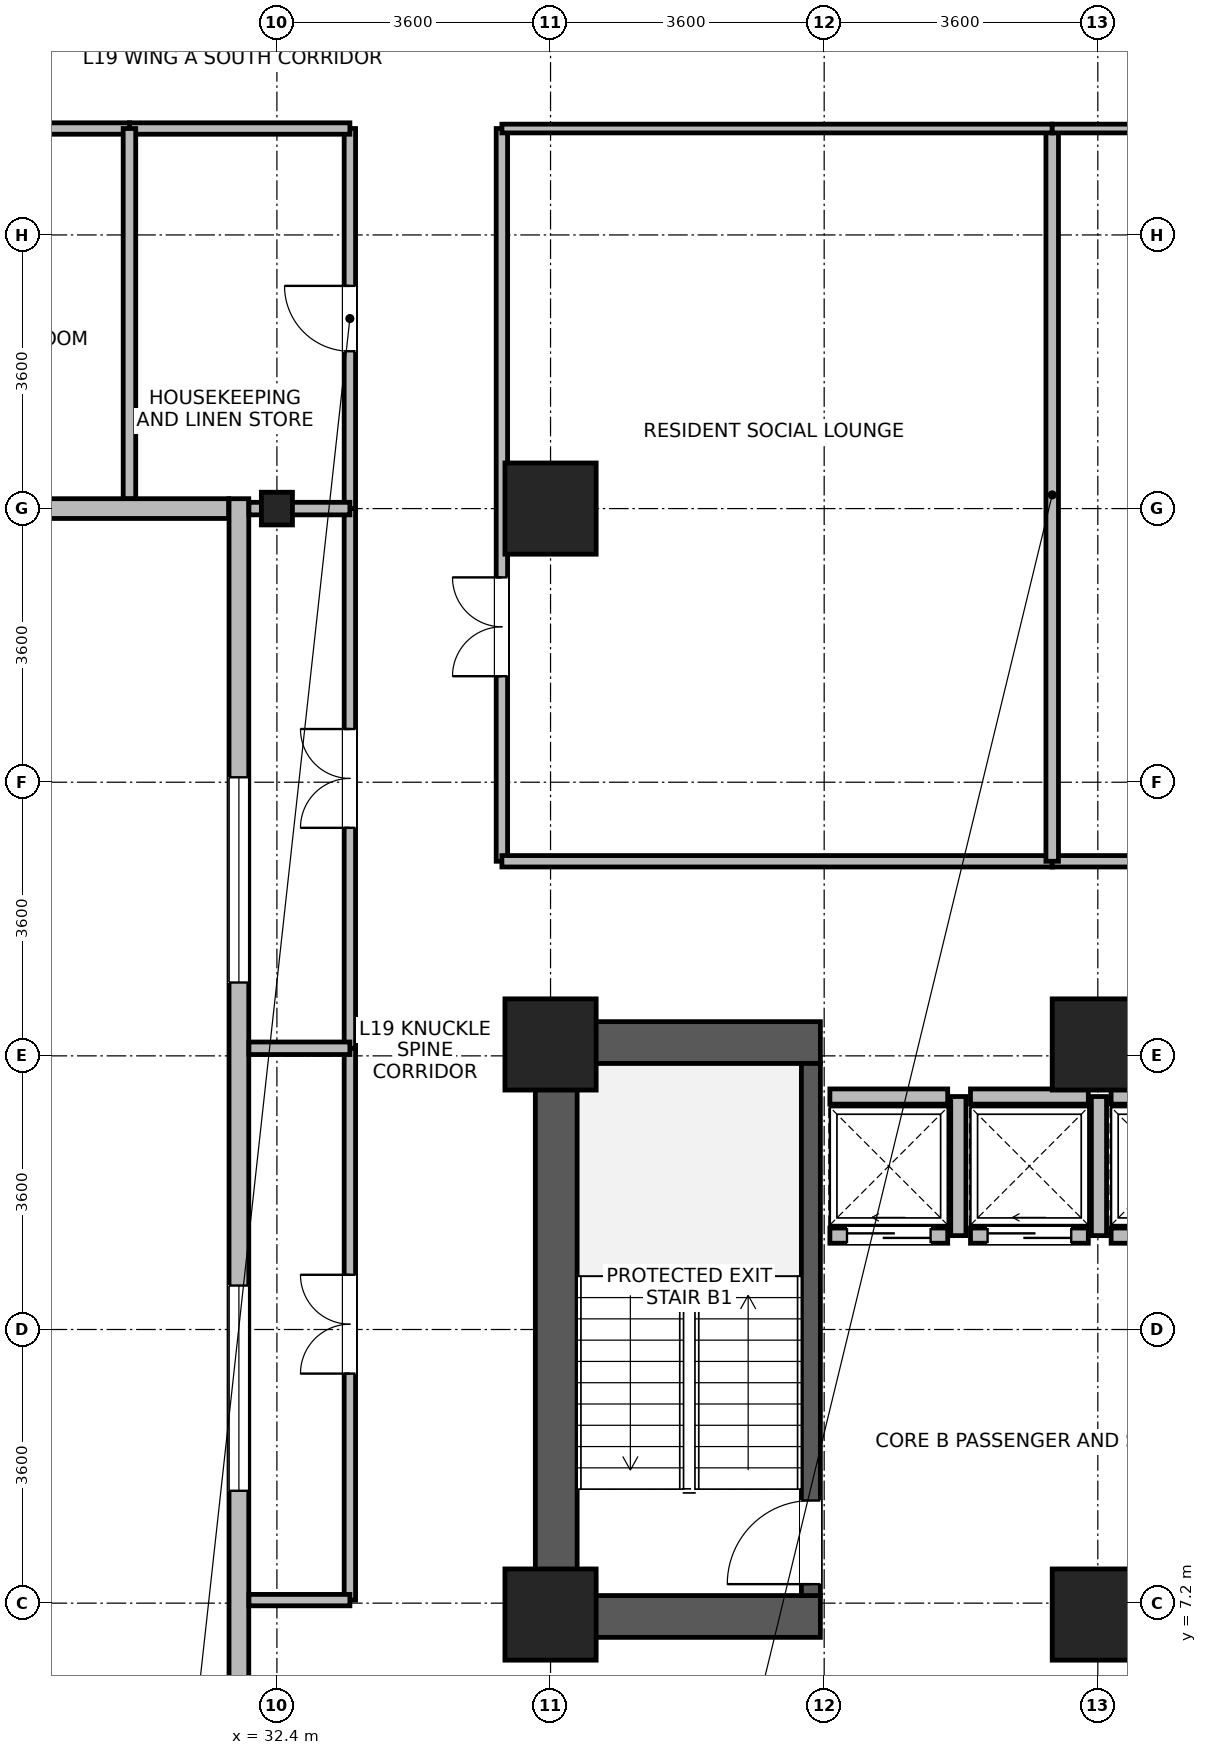
"""IFC4 building model, lengths in metres.
Left out: names, types, materials, properties, quantities, classifications, styles, units other than length and angle.
Written with IfcOpenShell. Run it as: python <this file> out.ifc"""

import sys

from ifc_helpers import new_model, si_unit, direction, frame, frame_2d, origin, origin_2d, place, context, subcontext, project, spatial, rectangle, i_section, extrude, source, transform, mapped, element, fill, save


model = new_model("IFC4")
c1 = context("Model", 3, precision=1e-05, world=origin(), true_north=direction((0.0, 1.0)))
c2 = subcontext(c1, "Body", "Model", "MODEL_VIEW")
j1 = project(units=[si_unit("LENGTHUNIT", "METRE"), si_unit("PLANEANGLEUNIT", "RADIAN")], contexts=[c1])
p1 = place(None, origin())
s1 = spatial("IfcSite", under=j1, at=p1, CompositionType="ELEMENT")
p2 = place(p1, origin())
s2 = spatial("IfcBuilding", under=s1, at=p2, CompositionType="ELEMENT")
p3 = place(p2, frame((0.0, 0.0, 78.6)))
s3 = spatial("IfcBuildingStorey", under=s2, at=p3, CompositionType="ELEMENT", Elevation=78.6)
p4 = place(p3, frame((36.075, 6.75, 0.0), z_axis=(0.0, 0.0, 1.0), x_axis=(0.0, 1.0, 0.0)))
e1 = element("IfcWall", 1, at=p4, inside=s3, PredefinedType="SHEAR", context=c2, shape_type="SweptSolid", body=[
    extrude(rectangle(XDim=8.1, YDim=0.55, at=frame_2d((4.05, 0.0))), origin(), (0.0, 0.0, 1.0), 3.45),
])
for number, where, z_axis, x_axis in (
    (2, (36.35, 7.025, 0.0), (0.0, 0.0, 1.0), (1.0, 0.0, 0.0)),
    (3, (36.35, 14.575, 0.0), (0.0, 0.0, 1.0), (1.0, 0.0, 0.0)),
):
    element("IfcWall", number, at=place(p3, frame(where, z_axis=z_axis, x_axis=x_axis)), inside=s3, PredefinedType="SHEAR", context=c2, shape_type="SweptSolid", body=[
        extrude(rectangle(XDim=3.2, YDim=0.55, at=frame_2d((1.6, 0.0))), origin(), (0.0, 0.0, 1.0), 3.45),
    ])
p5 = place(p3, frame((39.425, 7.3, 0.0), z_axis=(0.0, 0.0, 1.0), x_axis=(0.0, 1.0, 0.0)))
e4 = element("IfcWall", 4, at=p5, inside=s3, PredefinedType="SHEAR", context=c2, shape_type="SweptSolid", body=[
    extrude(rectangle(XDim=7.0, YDim=0.25, at=frame_2d((3.5, 0.0))), origin(), (0.0, 0.0, 1.0), 3.45),
])
p6 = place(p5, frame((0.15, 0.0, 0.0)))
e5 = element("IfcOpeningElement", 5, at=p6, cuts=e4, PredefinedType="OPENING", context=c2, shape_type="SweptSolid", body=[
    extrude(rectangle(XDim=1.1, YDim=2.08, at=frame_2d((0.55, 1.04))), frame((0.0, 0.135, 0.0), z_axis=(0.0, -1.0, 0.0), x_axis=(1.0, 0.0, 0.0)), (0.0, 0.0, 1.0), 0.27),
])
m1 = source(origin(), c2, "Body", "SweptSolid", [
    extrude(rectangle(XDim=1.2, YDim=1.2, at=origin_2d()), origin(), (0.0, 0.0, 1.0), 3.7),
])
for number, where, z_axis, x_axis in (
    (6, (36.0, 21.6, 0.0), (0.0, 0.0, 1.0), (1.0, 0.0, 0.0)),
    (7, (36.0, 7.05, 0.0), (0.0, 0.0, 1.0), (1.0, 0.0, 0.0)),
    (8, (36.0, 14.55, 0.0), (0.0, 0.0, 1.0), (1.0, 0.0, 0.0)),
    (9, (43.2, 7.05, 0.0), (0.0, 0.0, 1.0), (1.0, 0.0, 0.0)),
    (10, (43.2, 14.55, 0.0), (0.0, 0.0, 1.0), (1.0, 0.0, 0.0)),
):
    element("IfcColumn", number, at=place(p3, frame(where, z_axis=z_axis, x_axis=x_axis)), inside=s3, PredefinedType="COLUMN", context=c2, shape_type="MappedRepresentation", body=[
        mapped(m1, transform((0.0, 0.0, 0.0), x_axis=(1.0, 0.0, 0.0), y_axis=(0.0, 1.0, 0.0), z_axis=(0.0, 0.0, 1.0), scale=1.0)),
    ])
m2 = source(origin(), c2, "Body", "SweptSolid", [
    extrude(i_section(OverallWidth=0.409, OverallDepth=0.43, WebThickness=0.024, FlangeThickness=0.033, FilletRadius=0.015, at=origin_2d()), origin(), (0.0, 0.0, 1.0), 3.7),
])
p7 = place(p3, frame((32.4, 21.6, 0.0), z_axis=(0.0, 0.0, 1.0), x_axis=(1.0, 0.0, 0.0)))
e11 = element("IfcColumn", 11, at=p7, inside=s3, PredefinedType="COLUMN", context=c2, shape_type="MappedRepresentation", body=[
    mapped(m2, transform((0.0, 0.0, 0.0), x_axis=(1.0, 0.0, 0.0), y_axis=(0.0, 1.0, 0.0), z_axis=(0.0, 0.0, 1.0), scale=1.0)),
])
p8 = place(p3, frame((31.765, 21.6, 0.0), z_axis=(0.0, 0.0, 1.0), x_axis=(-1.0, 0.0, 0.0)))
e12 = element("IfcWall", 12, at=p8, inside=s3, PredefinedType="STANDARD", context=c2, shape_type="SweptSolid", body=[
    extrude(rectangle(XDim=2.364, YDim=0.26, at=frame_2d((1.182, 0.0))), origin(), (0.0, 0.0, 1.0), 2.93),
])
p9 = place(p3, frame((31.9, 1.67, 0.0), z_axis=(0.0, 0.0, 1.0), x_axis=(0.0, 1.0, 0.0)))
e13 = element("IfcWall", 13, at=p9, inside=s3, PredefinedType="STANDARD", context=c2, shape_type="SweptSolid", body=[
    extrude(rectangle(XDim=20.06, YDim=0.26, at=frame_2d((10.03, 0.0))), origin(), (0.0, 0.0, 1.0), 3.43),
])
p10 = place(p9, frame((7.008, 0.0, 0.85)))
e14 = element("IfcOpeningElement", 14, at=p10, cuts=e13, PredefinedType="OPENING", context=c2, shape_type="SweptSolid", body=[
    extrude(rectangle(XDim=2.7, YDim=2.05, at=frame_2d((1.35, 1.025))), frame((0.0, 0.14, 0.0), z_axis=(0.0, -1.0, 0.0), x_axis=(1.0, 0.0, 0.0)), (0.0, 0.0, 1.0), 0.28),
])
p11 = place(p9, frame((13.695, 0.0, 0.85)))
e15 = element("IfcOpeningElement", 15, at=p11, cuts=e13, PredefinedType="OPENING", context=c2, shape_type="SweptSolid", body=[
    extrude(rectangle(XDim=2.7, YDim=2.05, at=frame_2d((1.35, 1.025))), frame((0.0, 0.14, 0.0), z_axis=(0.0, -1.0, 0.0), x_axis=(1.0, 0.0, 0.0)), (0.0, 0.0, 1.0), 0.28),
])
p12 = place(p3, frame((39.675, 12.035, 0.0), z_axis=(0.0, 0.0, 1.0), x_axis=(1.0, 0.0, 0.0)))
e16 = element("IfcWall", 16, at=p12, inside=s3, PredefinedType="PARTITIONING", context=c2, shape_type="SweptSolid", body=[
    extrude(rectangle(XDim=1.55, YDim=0.2, at=frame_2d((0.775, 0.0))), origin(), (0.0, 0.0, 1.0), 3.43),
])
p13 = place(p12, frame((0.225, 0.0, 0.0)))
e17 = element("IfcOpeningElement", 17, at=p13, cuts=e16, PredefinedType="OPENING", context=c2, shape_type="SweptSolid", body=[
    extrude(rectangle(XDim=1.1, YDim=2.12, at=frame_2d((0.55, 1.06))), frame((0.0, 0.11, 0.0), z_axis=(0.0, -1.0, 0.0), x_axis=(1.0, 0.0, 0.0)), (0.0, 0.0, 1.0), 0.22),
])
p14 = place(p3, frame((39.675, 13.865, 0.0), z_axis=(0.0, 0.0, 1.0), x_axis=(1.0, 0.0, 0.0)))
e18 = element("IfcWall", 18, at=p14, inside=s3, PredefinedType="PARTITIONING", context=c2, shape_type="SweptSolid", body=[
    extrude(rectangle(XDim=1.55, YDim=0.2, at=frame_2d((0.775, 0.0))), origin(), (0.0, 0.0, 1.0), 3.43),
])
p15 = place(p3, frame((41.365, 12.035, 0.0), z_axis=(0.0, 0.0, 1.0), x_axis=(0.0, 1.0, 0.0)))
e19 = element("IfcWall", 19, at=p15, inside=s3, PredefinedType="PARTITIONING", context=c2, shape_type="SweptSolid", body=[
    extrude(rectangle(XDim=1.83, YDim=0.2, at=frame_2d((0.915, 0.0))), origin(), (0.0, 0.0, 1.0), 3.43),
])
p16 = place(p3, frame((41.525, 12.035, 0.0), z_axis=(0.0, 0.0, 1.0), x_axis=(1.0, 0.0, 0.0)))
e20 = element("IfcWall", 20, at=p16, inside=s3, PredefinedType="PARTITIONING", context=c2, shape_type="SweptSolid", body=[
    extrude(rectangle(XDim=1.55, YDim=0.2, at=frame_2d((0.775, 0.0))), origin(), (0.0, 0.0, 1.0), 3.43),
])
p17 = place(p16, frame((0.225, 0.0, 0.0)))
e21 = element("IfcOpeningElement", 21, at=p17, cuts=e20, PredefinedType="OPENING", context=c2, shape_type="SweptSolid", body=[
    extrude(rectangle(XDim=1.1, YDim=2.12, at=frame_2d((0.55, 1.06))), frame((0.0, 0.11, 0.0), z_axis=(0.0, -1.0, 0.0), x_axis=(1.0, 0.0, 0.0)), (0.0, 0.0, 1.0), 0.22),
])
p18 = place(p3, frame((41.525, 13.865, 0.0), z_axis=(0.0, 0.0, 1.0), x_axis=(1.0, 0.0, 0.0)))
e22 = element("IfcWall", 22, at=p18, inside=s3, PredefinedType="PARTITIONING", context=c2, shape_type="SweptSolid", body=[
    extrude(rectangle(XDim=1.55, YDim=0.2, at=frame_2d((0.775, 0.0))), origin(), (0.0, 0.0, 1.0), 3.43),
])
p19 = place(p3, frame((43.215, 12.035, 0.0), z_axis=(0.0, 0.0, 1.0), x_axis=(0.0, 1.0, 0.0)))
e23 = element("IfcWall", 23, at=p19, inside=s3, PredefinedType="PARTITIONING", context=c2, shape_type="SweptSolid", body=[
    extrude(rectangle(XDim=1.83, YDim=0.2, at=frame_2d((0.915, 0.0))), origin(), (0.0, 0.0, 1.0), 3.43),
])
p20 = place(p3, frame((43.375, 12.035, 0.0), z_axis=(0.0, 0.0, 1.0), x_axis=(1.0, 0.0, 0.0)))
e24 = element("IfcWall", 24, at=p20, inside=s3, PredefinedType="PARTITIONING", context=c2, shape_type="SweptSolid", body=[
    extrude(rectangle(XDim=1.55, YDim=0.2, at=frame_2d((0.775, 0.0))), origin(), (0.0, 0.0, 1.0), 3.43),
])
p21 = place(p20, frame((0.225, 0.0, 0.0)))
e25 = element("IfcOpeningElement", 25, at=p21, cuts=e24, PredefinedType="OPENING", context=c2, shape_type="SweptSolid", body=[
    extrude(rectangle(XDim=1.1, YDim=2.12, at=frame_2d((0.55, 1.06))), frame((0.0, 0.11, 0.0), z_axis=(0.0, -1.0, 0.0), x_axis=(1.0, 0.0, 0.0)), (0.0, 0.0, 1.0), 0.22),
])
p22 = place(p3, frame((43.375, 13.865, 0.0), z_axis=(0.0, 0.0, 1.0), x_axis=(1.0, 0.0, 0.0)))
e26 = element("IfcWall", 26, at=p22, inside=s3, PredefinedType="PARTITIONING", context=c2, shape_type="SweptSolid", body=[
    extrude(rectangle(XDim=1.55, YDim=0.2, at=frame_2d((0.775, 0.0))), origin(), (0.0, 0.0, 1.0), 3.43),
])
p23 = place(p3, frame((35.36, 16.96, 0.0), z_axis=(0.0, 0.0, 1.0), x_axis=(0.0, 1.0, 0.0)))
e27 = element("IfcWall", 27, at=p23, inside=s3, PredefinedType="PARTITIONING", context=c2, shape_type="SweptSolid", body=[
    extrude(rectangle(XDim=9.64, YDim=0.15, at=frame_2d((4.82, 0.0))), origin(), (0.0, 0.0, 1.0), 3.43),
])
p24 = place(p23, frame((2.435, 0.0, 0.0)))
e28 = element("IfcOpeningElement", 28, at=p24, cuts=e27, PredefinedType="OPENING", context=c2, shape_type="SweptSolid", body=[
    extrude(rectangle(XDim=1.3, YDim=2.12, at=frame_2d((0.65, 1.06))), frame((0.0, 0.085, 0.0), z_axis=(0.0, -1.0, 0.0), x_axis=(1.0, 0.0, 0.0)), (0.0, 0.0, 1.0), 0.17),
])
p25 = place(p3, frame((33.36, 7.24, 0.0), z_axis=(0.0, 0.0, 1.0), x_axis=(0.0, 1.0, 0.0)))
e29 = element("IfcWall", 29, at=p25, inside=s3, PredefinedType="PARTITIONING", context=c2, shape_type="SweptSolid", body=[
    extrude(rectangle(XDim=7.26, YDim=0.15, at=frame_2d((3.63, 0.0))), origin(), (0.0, 0.0, 1.0), 3.43),
])
p26 = place(p25, frame((2.98, 0.0, 0.0)))
e30 = element("IfcOpeningElement", 30, at=p26, cuts=e29, PredefinedType="OPENING", context=c2, shape_type="SweptSolid", body=[
    extrude(rectangle(XDim=1.3, YDim=2.12, at=frame_2d((0.65, 1.06))), frame((0.0, 0.085, 0.0), z_axis=(0.0, -1.0, 0.0), x_axis=(1.0, 0.0, 0.0)), (0.0, 0.0, 1.0), 0.17),
])
p27 = place(p3, frame((35.36, 16.96, 0.0), z_axis=(0.0, 0.0, 1.0), x_axis=(1.0, 0.0, 0.0)))
e31 = element("IfcWall", 31, at=p27, inside=s3, PredefinedType="PARTITIONING", context=c2, shape_type="SweptSolid", body=[
    extrude(rectangle(XDim=7.24, YDim=0.15, at=frame_2d((3.62, 0.0))), origin(), (0.0, 0.0, 1.0), 3.43),
])
p28 = place(p3, frame((33.36, 14.5, 0.0), z_axis=(0.0, 0.0, 1.0), x_axis=(0.0, 1.0, 0.0)))
e32 = element("IfcWall", 32, at=p28, inside=s3, PredefinedType="PARTITIONING", context=c2, shape_type="SweptSolid", body=[
    extrude(rectangle(XDim=7.1, YDim=0.15, at=frame_2d((3.55, 0.0))), origin(), (0.0, 0.0, 1.0), 3.43),
])
p29 = place(p28, frame((2.9, 0.0, 0.0)))
e33 = element("IfcOpeningElement", 33, at=p29, cuts=e32, PredefinedType="OPENING", context=c2, shape_type="SweptSolid", body=[
    extrude(rectangle(XDim=1.3, YDim=2.12, at=frame_2d((0.65, 1.06))), frame((0.0, 0.085, 0.0), z_axis=(0.0, -1.0, 0.0), x_axis=(1.0, 0.0, 0.0)), (0.0, 0.0, 1.0), 0.17),
])
p30 = place(p3, frame((42.6, 16.96, 0.0), z_axis=(0.0, 0.0, 1.0), x_axis=(1.0, 0.0, 0.0)))
e34 = element("IfcWall", 34, at=p30, inside=s3, PredefinedType="PARTITIONING", context=c2, shape_type="SweptSolid", body=[
    extrude(rectangle(XDim=6.92, YDim=0.15, at=frame_2d((3.46, 0.0))), origin(), (0.0, 0.0, 1.0), 3.43),
])
p31 = place(p30, frame((2.81, 0.0, 0.0)))
e35 = element("IfcOpeningElement", 35, at=p31, cuts=e34, PredefinedType="OPENING", context=c2, shape_type="SweptSolid", body=[
    extrude(rectangle(XDim=1.3, YDim=2.12, at=frame_2d((0.65, 1.06))), frame((0.0, 0.085, 0.0), z_axis=(0.0, -1.0, 0.0), x_axis=(1.0, 0.0, 0.0)), (0.0, 0.0, 1.0), 0.17),
])
p32 = place(p3, frame((24.92, 26.6, 0.0), z_axis=(0.0, 0.0, 1.0), x_axis=(1.0, 0.0, 0.0)))
e36 = element("IfcWall", 36, at=p32, inside=s3, PredefinedType="PARTITIONING", context=c2, shape_type="SweptSolid", body=[
    extrude(rectangle(XDim=5.54, YDim=0.15, at=frame_2d((2.77, 0.0))), origin(), (0.0, 0.0, 1.0), 3.43),
])
p33 = place(p32, frame((2.12, 0.0, 0.0)))
e37 = element("IfcOpeningElement", 37, at=p33, cuts=e36, PredefinedType="OPENING", context=c2, shape_type="SweptSolid", body=[
    extrude(rectangle(XDim=1.3, YDim=2.12, at=frame_2d((0.65, 1.06))), frame((0.0, 0.085, 0.0), z_axis=(0.0, -1.0, 0.0), x_axis=(1.0, 0.0, 0.0)), (0.0, 0.0, 1.0), 0.17),
])
p34 = place(p3, frame((33.36, 21.6, 0.0), z_axis=(0.0, 0.0, 1.0), x_axis=(0.0, 1.0, 0.0)))
e38 = element("IfcWall", 38, at=p34, inside=s3, PredefinedType="PARTITIONING", context=c2, shape_type="SweptSolid", body=[
    extrude(rectangle(XDim=5.0, YDim=0.15, at=frame_2d((2.5, 0.0))), origin(), (0.0, 0.0, 1.0), 3.43),
])
p35 = place(p34, frame((2.07, 0.0, 0.0)))
e39 = element("IfcOpeningElement", 39, at=p35, cuts=e38, PredefinedType="OPENING", context=c2, shape_type="SweptSolid", body=[
    extrude(rectangle(XDim=0.86, YDim=2.02, at=frame_2d((0.43, 1.01))), frame((0.0, 0.085, 0.0), z_axis=(0.0, -1.0, 0.0), x_axis=(1.0, 0.0, 0.0)), (0.0, 0.0, 1.0), 0.17),
])
p36 = place(p3, frame((30.46, 26.6, 0.0), z_axis=(0.0, 0.0, 1.0), x_axis=(1.0, 0.0, 0.0)))
e40 = element("IfcWall", 40, at=p36, inside=s3, PredefinedType="PARTITIONING", context=c2, shape_type="SweptSolid", body=[
    extrude(rectangle(XDim=2.9, YDim=0.15, at=frame_2d((1.45, 0.0))), origin(), (0.0, 0.0, 1.0), 3.43),
])
p37 = place(p3, frame((32.032, 7.24, 0.0), z_axis=(0.0, 0.0, 1.0), x_axis=(1.0, 0.0, 0.0)))
e41 = element("IfcWall", 41, at=p37, inside=s3, PredefinedType="PARTITIONING", context=c2, shape_type="SweptSolid", body=[
    extrude(rectangle(XDim=1.328, YDim=0.15, at=frame_2d((0.664, 0.0))), origin(), (0.0, 0.0, 1.0), 3.43),
])
p38 = place(p3, frame((42.6, 16.96, 0.0), z_axis=(0.0, 0.0, 1.0), x_axis=(0.0, 1.0, 0.0)))
e42 = element("IfcWall", 42, at=p38, inside=s3, PredefinedType="PARTITIONING", context=c2, shape_type="SweptSolid", body=[
    extrude(rectangle(XDim=9.64, YDim=0.165, at=frame_2d((4.82, 0.0))), origin(), (0.0, 0.0, 1.0), 3.43),
])
p39 = place(p3, frame((35.36, 26.6, 0.0), z_axis=(0.0, 0.0, 1.0), x_axis=(1.0, 0.0, 0.0)))
e43 = element("IfcWall", 43, at=p39, inside=s3, PredefinedType="PARTITIONING", context=c2, shape_type="SweptSolid", body=[
    extrude(rectangle(XDim=7.24, YDim=0.115, at=frame_2d((3.62, 0.0))), origin(), (0.0, 0.0, 1.0), 3.43),
])
p40 = place(p3, frame((42.6, 26.6, 0.0), z_axis=(0.0, 0.0, 1.0), x_axis=(1.0, 0.0, 0.0)))
e44 = element("IfcWall", 44, at=p40, inside=s3, PredefinedType="PARTITIONING", context=c2, shape_type="SweptSolid", body=[
    extrude(rectangle(XDim=6.92, YDim=0.115, at=frame_2d((3.46, 0.0))), origin(), (0.0, 0.0, 1.0), 3.43),
])
p41 = place(p3, frame((30.46, 21.732, 0.0), z_axis=(0.0, 0.0, 1.0), x_axis=(0.0, 1.0, 0.0)))
e45 = element("IfcWall", 45, at=p41, inside=s3, PredefinedType="PARTITIONING", context=c2, shape_type="SweptSolid", body=[
    extrude(rectangle(XDim=4.868, YDim=0.165, at=frame_2d((2.434, 0.0))), origin(), (0.0, 0.0, 1.0), 3.43),
])
p42 = place(p3, frame((32.032, 14.5, 0.0), z_axis=(0.0, 0.0, 1.0), x_axis=(1.0, 0.0, 0.0)))
e46 = element("IfcWall", 46, at=p42, inside=s3, PredefinedType="PARTITIONING", context=c2, shape_type="SweptSolid", body=[
    extrude(rectangle(XDim=1.328, YDim=0.165, at=frame_2d((0.664, 0.0))), origin(), (0.0, 0.0, 1.0), 3.43),
])
p43 = place(p3, frame((32.032, 21.6, 0.0), z_axis=(0.0, 0.0, 1.0), x_axis=(1.0, 0.0, 0.0)))
e47 = element("IfcWall", 47, at=p43, inside=s3, PredefinedType="PARTITIONING", context=c2, shape_type="SweptSolid", body=[
    extrude(rectangle(XDim=1.328, YDim=0.165, at=frame_2d((0.664, 0.0))), origin(), (0.0, 0.0, 1.0), 2.93),
])
p44 = place(p10, origin())
e48 = element("IfcWindow", 48, at=p44, inside=s3, PartitioningType="SINGLE_PANEL", PredefinedType="WINDOW", context=c2, shape_type="SweptSolid", body=[
    extrude(rectangle(XDim=2.7, YDim=2.05, at=frame_2d((1.35, 1.025))), frame((0.0, 0.03, 0.0), z_axis=(0.0, -1.0, 0.0), x_axis=(1.0, 0.0, 0.0)), (0.0, 0.0, 1.0), 0.06),
])
fill(e14, e48)
p45 = place(p11, origin())
e49 = element("IfcWindow", 49, at=p45, inside=s3, PartitioningType="SINGLE_PANEL", PredefinedType="WINDOW", context=c2, shape_type="SweptSolid", body=[
    extrude(rectangle(XDim=2.7, YDim=2.05, at=frame_2d((1.35, 1.025))), frame((0.0, 0.03, 0.0), z_axis=(0.0, -1.0, 0.0), x_axis=(1.0, 0.0, 0.0)), (0.0, 0.0, 1.0), 0.06),
])
fill(e15, e49)
p46 = place(p6, origin())
e50 = element("IfcDoor", 50, at=p46, inside=s3, OperationType="SINGLE_SWING_LEFT", PredefinedType="DOOR", context=c2, shape_type="SweptSolid", body=[
    extrude(rectangle(XDim=1.1, YDim=2.08, at=frame_2d((0.55, 1.04))), frame((0.0, 0.025, 0.0), z_axis=(0.0, -1.0, 0.0), x_axis=(1.0, 0.0, 0.0)), (0.0, 0.0, 1.0), 0.05),
])
fill(e5, e50)
p47 = place(p13, origin())
e51 = element("IfcDoor", 51, at=p47, inside=s3, OperationType="SLIDING_TO_LEFT", PredefinedType="DOOR", context=c2, shape_type="SweptSolid", body=[
    extrude(rectangle(XDim=1.1, YDim=2.12, at=frame_2d((0.55, 1.06))), frame((0.0, 0.025, 0.0), z_axis=(0.0, -1.0, 0.0), x_axis=(1.0, 0.0, 0.0)), (0.0, 0.0, 1.0), 0.05),
])
fill(e17, e51)
p48 = place(p17, origin())
e52 = element("IfcDoor", 52, at=p48, inside=s3, OperationType="SLIDING_TO_LEFT", PredefinedType="DOOR", context=c2, shape_type="SweptSolid", body=[
    extrude(rectangle(XDim=1.1, YDim=2.12, at=frame_2d((0.55, 1.06))), frame((0.0, 0.025, 0.0), z_axis=(0.0, -1.0, 0.0), x_axis=(1.0, 0.0, 0.0)), (0.0, 0.0, 1.0), 0.05),
])
fill(e21, e52)
p49 = place(p24, origin())
e53 = element("IfcDoor", 53, at=p49, inside=s3, OperationType="DOUBLE_DOOR_SINGLE_SWING", PredefinedType="DOOR", context=c2, shape_type="SweptSolid", body=[
    extrude(rectangle(XDim=1.3, YDim=2.12, at=frame_2d((0.65, 1.06))), frame((0.0, 0.025, 0.0), z_axis=(0.0, -1.0, 0.0), x_axis=(1.0, 0.0, 0.0)), (0.0, 0.0, 1.0), 0.05),
])
fill(e28, e53)
p50 = place(p26, origin())
e54 = element("IfcDoor", 54, at=p50, inside=s3, OperationType="DOUBLE_DOOR_SINGLE_SWING", PredefinedType="DOOR", context=c2, shape_type="SweptSolid", body=[
    extrude(rectangle(XDim=1.3, YDim=2.12, at=frame_2d((0.65, 1.06))), frame((0.0, 0.025, 0.0), z_axis=(0.0, -1.0, 0.0), x_axis=(1.0, 0.0, 0.0)), (0.0, 0.0, 1.0), 0.05),
])
fill(e30, e54)
p51 = place(p29, origin())
e55 = element("IfcDoor", 55, at=p51, inside=s3, OperationType="DOUBLE_DOOR_SINGLE_SWING", PredefinedType="DOOR", context=c2, shape_type="SweptSolid", body=[
    extrude(rectangle(XDim=1.3, YDim=2.12, at=frame_2d((0.65, 1.06))), frame((0.0, 0.025, 0.0), z_axis=(0.0, -1.0, 0.0), x_axis=(1.0, 0.0, 0.0)), (0.0, 0.0, 1.0), 0.05),
])
fill(e33, e55)
p52 = place(p35, origin())
e56 = element("IfcDoor", 56, at=p52, inside=s3, OperationType="SINGLE_SWING_RIGHT", PredefinedType="DOOR", context=c2, shape_type="SweptSolid", body=[
    extrude(rectangle(XDim=0.86, YDim=2.02, at=frame_2d((0.43, 1.01))), frame((0.0, 0.025, 0.0), z_axis=(0.0, -1.0, 0.0), x_axis=(1.0, 0.0, 0.0)), (0.0, 0.0, 1.0), 0.05),
])
fill(e39, e56)
save(model, sys.argv[1])
